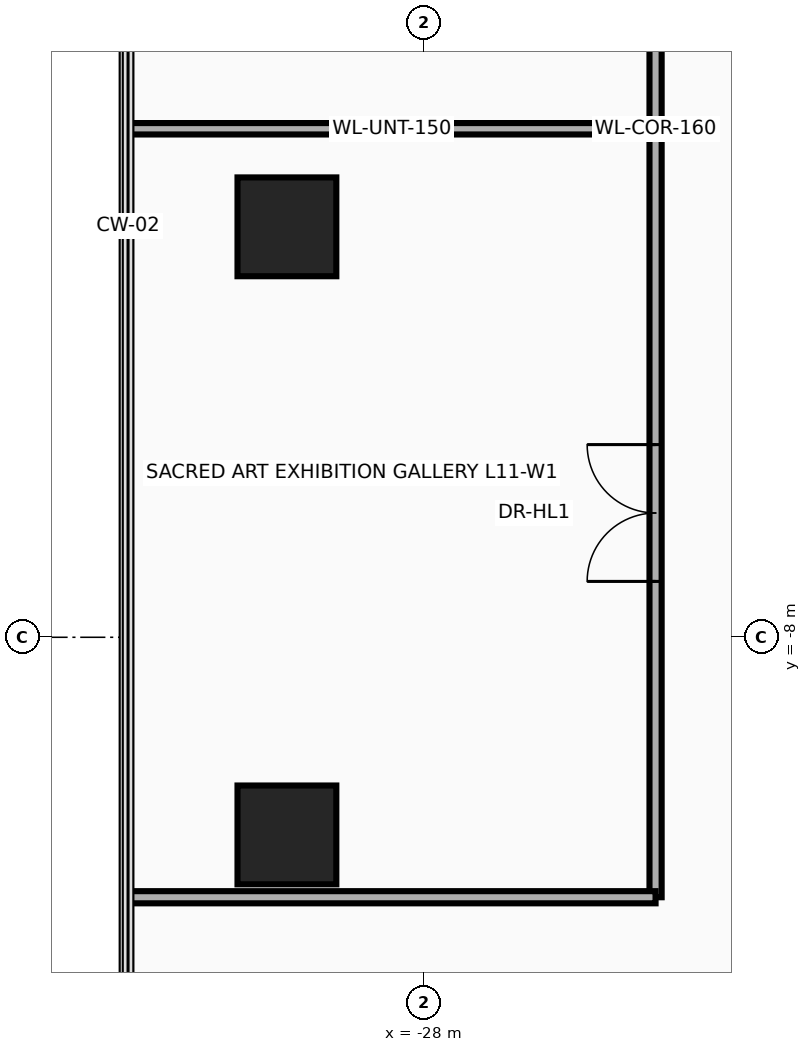
"""IFC4 building model, lengths in metres.
Left out: names, types, materials, properties, quantities, classifications, styles, units other than length and angle.
Written with IfcOpenShell. Run it as: python <this file> out.ifc"""

import sys

from ifc_helpers import new_model, si_unit, direction, frame, frame_2d, origin, origin_2d, place, context, subcontext, project, spatial, rectangle, circle, extrude, source, transform, mapped, element, fill, save


model = new_model("IFC4")
c1 = context("Model", 3, precision=1e-05, world=origin(), true_north=direction((0.0, 1.0)))
c2 = subcontext(c1, "Body", "Model", "MODEL_VIEW")
j1 = project(units=[si_unit("LENGTHUNIT", "METRE"), si_unit("PLANEANGLEUNIT", "RADIAN")], contexts=[c1])
p1 = place(None, origin())
s1 = spatial("IfcSite", under=j1, at=p1, CompositionType="ELEMENT")
p2 = place(p1, origin())
s2 = spatial("IfcBuilding", under=s1, at=p2, CompositionType="ELEMENT")
p3 = place(p2, frame((0.0, 0.0, 48.2)))
s3 = spatial("IfcBuildingStorey", under=s2, at=p3, CompositionType="ELEMENT", Elevation=48.2)
m1 = source(origin(), c2, "Body", "SweptSolid", [
    extrude(circle(Radius=0.65, at=origin_2d()), origin(), (0.0, 0.0, 1.0), 3.7),
])
for number, where, z_axis, x_axis in (
    (1, (-29.8, -10.6, 0.0), (0.0, 0.0, 1.0), (1.0, 0.0, 0.0)),
    (2, (-29.8, -2.6, 0.0), (0.0, 0.0, 1.0), (1.0, 0.0, 0.0)),
):
    element("IfcColumn", number, at=place(p3, frame(where, z_axis=z_axis, x_axis=x_axis)), inside=s3, PredefinedType="COLUMN", context=c2, shape_type="MappedRepresentation", body=[
        mapped(m1, transform((0.0, 0.0, 0.0), x_axis=(1.0, 0.0, 0.0), y_axis=(0.0, 1.0, 0.0), z_axis=(0.0, 0.0, 1.0), scale=1.0)),
    ])
p4 = place(p3, frame((-24.95, -11.42, 0.0), z_axis=(0.0, 0.0, 1.0), x_axis=(0.0, 1.0, 0.0)))
e3 = element("IfcWall", 3, at=p4, inside=s3, PredefinedType="PARTITIONING", context=c2, shape_type="SweptSolid", body=[
    extrude(rectangle(XDim=20.22, YDim=0.16, at=frame_2d((10.11, 0.0))), origin(), (0.0, 0.0, 1.0), 2.583),
])
p5 = place(p4, frame((4.155, 0.0, 0.0)))
e4 = element("IfcOpeningElement", 4, at=p5, cuts=e3, PredefinedType="OPENING", context=c2, shape_type="SweptSolid", body=[
    extrude(rectangle(XDim=1.8, YDim=2.15, at=frame_2d((0.9, 1.075))), frame((0.0, 0.095, 0.0), z_axis=(0.0, -1.0, 0.0), x_axis=(1.0, 0.0, 0.0)), (0.0, 0.0, 1.0), 0.19),
])
p6 = place(p4, frame((14.715, 0.0, 0.0)))
e5 = element("IfcOpeningElement", 5, at=p6, cuts=e3, PredefinedType="OPENING", context=c2, shape_type="SweptSolid", body=[
    extrude(rectangle(XDim=0.9, YDim=2.1, at=frame_2d((0.45, 1.05))), frame((0.0, 0.095, 0.0), z_axis=(0.0, -1.0, 0.0), x_axis=(1.0, 0.0, 0.0)), (0.0, 0.0, 1.0), 0.19),
])
p7 = place(p3, frame((-31.89, -1.31, 0.0), z_axis=(0.0, 0.0, 1.0), x_axis=(1.0, 0.0, 0.0)))
e6 = element("IfcWall", 6, at=p7, inside=s3, PredefinedType="PARTITIONING", context=c2, shape_type="SweptSolid", body=[
    extrude(rectangle(XDim=6.94, YDim=0.15, at=frame_2d((3.47, 0.0))), origin(), (0.0, 0.0, 1.0), 2.896),
])
p8 = place(p3, frame((-31.89, -11.42, 0.0), z_axis=(0.0, 0.0, 1.0), x_axis=(1.0, 0.0, 0.0)))
e7 = element("IfcWall", 7, at=p8, inside=s3, PredefinedType="PARTITIONING", context=c2, shape_type="SweptSolid", body=[
    extrude(rectangle(XDim=6.94, YDim=0.16, at=frame_2d((3.47, 0.0))), origin(), (0.0, 0.0, 1.0), 3.46),
])
p9 = place(p5, origin())
e8 = element("IfcDoor", 8, at=p9, inside=s3, OperationType="DOUBLE_DOOR_SINGLE_SWING", PredefinedType="DOOR", context=c2, shape_type="SweptSolid", body=[
    extrude(rectangle(XDim=1.8, YDim=2.15, at=frame_2d((0.9, 1.075))), frame((0.0, 0.025, 0.0), z_axis=(0.0, -1.0, 0.0), x_axis=(1.0, 0.0, 0.0)), (0.0, 0.0, 1.0), 0.05),
])
fill(e4, e8)
save(model, sys.argv[1])
